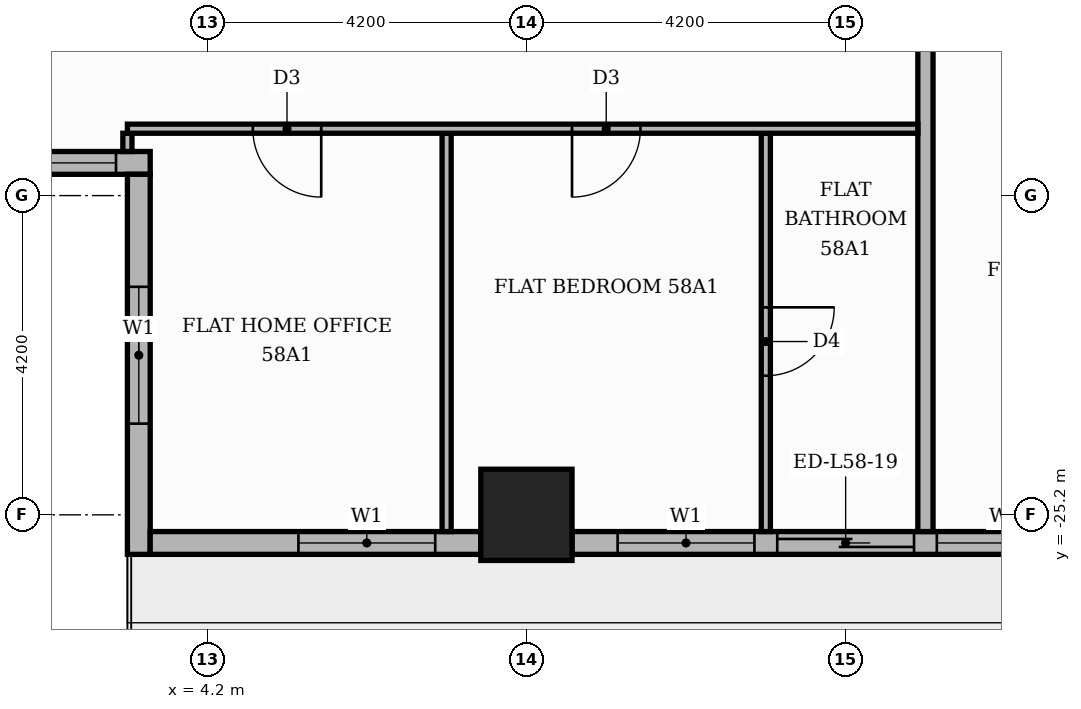
"""IFC4 building model, lengths in metres.
Left out: names, types, materials, properties, quantities, classifications, styles, units other than length and angle.
Written with IfcOpenShell. Run it as: python <this file> out.ifc"""

import sys

from ifc_helpers import new_model, si_unit, direction, frame, frame_2d, origin, origin_2d, place, context, subcontext, project, spatial, rectangle, extrude, element, fill, save


model = new_model("IFC4")
c1 = context("Model", 3, precision=1e-05, world=origin(), true_north=direction((0.0, 1.0)))
c2 = subcontext(c1, "Body", "Model", "MODEL_VIEW")
j1 = project(units=[si_unit("LENGTHUNIT", "METRE"), si_unit("PLANEANGLEUNIT", "RADIAN")], contexts=[c1])
p1 = place(None, origin())
s1 = spatial("IfcSite", under=j1, at=p1, CompositionType="ELEMENT")
p2 = place(p1, origin())
s2 = spatial("IfcBuilding", under=s1, at=p2, CompositionType="ELEMENT")
p3 = place(p2, frame((0.0, 0.0, 244.5)))
s3 = spatial("IfcBuildingStorey", under=s2, at=p3, CompositionType="ELEMENT", Elevation=244.5)
p4 = place(p3, frame((8.4, -25.2, 0.0), z_axis=(0.0, 0.0, 1.0), x_axis=(1.0, 0.0, 0.0)))
e1 = element("IfcColumn", 1, at=p4, inside=s3, PredefinedType="COLUMN", context=c2, shape_type="SweptSolid", body=[
    extrude(rectangle(XDim=1.2, YDim=1.2, at=origin_2d()), origin(), (0.0, 0.0, 1.0), 3.9),
])
p5 = place(p3, frame((-3.15, -20.57, 0.0), z_axis=(0.0, 0.0, 1.0), x_axis=(1.0, 0.0, 0.0)))
e2 = element("IfcWall", 2, at=p5, inside=s3, PredefinedType="STANDARD", context=c2, shape_type="SweptSolid", body=[
    extrude(rectangle(XDim=6.6, YDim=0.3, at=frame_2d((3.3, 0.0))), origin(), (0.0, 0.0, 1.0), 3.48),
])
p6 = place(p5, frame((0.15, 0.0, 0.9)))
e3 = element("IfcOpeningElement", 3, at=p6, cuts=e2, PredefinedType="OPENING", context=c2, shape_type="SweptSolid", body=[
    extrude(rectangle(XDim=6.0, YDim=2.1, at=frame_2d((3.0, 1.05))), frame((0.0, 0.16, 0.0), z_axis=(0.0, -1.0, 0.0), x_axis=(1.0, 0.0, 0.0)), (0.0, 0.0, 1.0), 0.32),
])
p7 = place(p3, frame((3.3, -20.72, 0.0), z_axis=(0.0, 0.0, 1.0), x_axis=(0.0, -1.0, 0.0)))
e4 = element("IfcWall", 4, at=p7, inside=s3, PredefinedType="STANDARD", context=c2, shape_type="SweptSolid", body=[
    extrude(rectangle(XDim=5.0, YDim=0.3, at=frame_2d((2.5, 0.0))), origin(), (0.0, 0.0, 1.0), 3.48),
])
p8 = place(p7, frame((1.48, 0.0, 0.9)))
e5 = element("IfcOpeningElement", 5, at=p8, cuts=e4, PredefinedType="OPENING", context=c2, shape_type="SweptSolid", body=[
    extrude(rectangle(XDim=1.8, YDim=2.1, at=frame_2d((0.9, 1.05))), frame((0.0, 0.16, 0.0), z_axis=(0.0, -1.0, 0.0), x_axis=(1.0, 0.0, 0.0)), (0.0, 0.0, 1.0), 0.32),
])
p9 = place(p3, frame((3.45, -25.57, 0.0), z_axis=(0.0, 0.0, 1.0), x_axis=(1.0, 0.0, 0.0)))
e6 = element("IfcWall", 6, at=p9, inside=s3, PredefinedType="STANDARD", context=c2, shape_type="SweptSolid", body=[
    extrude(rectangle(XDim=4.35, YDim=0.3, at=frame_2d((2.175, 0.0))), origin(), (0.0, 0.0, 1.0), 3.48),
])
p10 = place(p9, frame((1.95, 0.0, 0.9)))
e7 = element("IfcOpeningElement", 7, at=p10, cuts=e6, PredefinedType="OPENING", context=c2, shape_type="SweptSolid", body=[
    extrude(rectangle(XDim=1.8, YDim=2.1, at=frame_2d((0.9, 1.05))), frame((0.0, 0.16, 0.0), z_axis=(0.0, -1.0, 0.0), x_axis=(1.0, 0.0, 0.0)), (0.0, 0.0, 1.0), 0.32),
])
p11 = place(p3, frame((9.0, -25.57, 0.0), z_axis=(0.0, 0.0, 1.0), x_axis=(1.0, 0.0, 0.0)))
e8 = element("IfcWall", 8, at=p11, inside=s3, PredefinedType="STANDARD", context=c2, shape_type="SweptSolid", body=[
    extrude(rectangle(XDim=7.2, YDim=0.3, at=frame_2d((3.6, 0.0))), origin(), (0.0, 0.0, 1.0), 3.48),
])
p12 = place(p11, frame((0.6, 0.0, 0.9)))
e9 = element("IfcOpeningElement", 9, at=p12, cuts=e8, PredefinedType="OPENING", context=c2, shape_type="SweptSolid", body=[
    extrude(rectangle(XDim=1.8, YDim=2.1, at=frame_2d((0.9, 1.05))), frame((0.0, 0.16, 0.0), z_axis=(0.0, -1.0, 0.0), x_axis=(1.0, 0.0, 0.0)), (0.0, 0.0, 1.0), 0.32),
])
p13 = place(p11, frame((2.7, 0.0, 0.0)))
e10 = element("IfcOpeningElement", 10, at=p13, cuts=e8, PredefinedType="OPENING", context=c2, shape_type="SweptSolid", body=[
    extrude(rectangle(XDim=1.8, YDim=2.4, at=frame_2d((0.9, 1.2))), frame((0.0, 0.16, 0.0), z_axis=(0.0, -1.0, 0.0), x_axis=(1.0, 0.0, 0.0)), (0.0, 0.0, 1.0), 0.32),
])
p14 = place(p11, frame((4.8, 0.0, 0.9)))
e11 = element("IfcOpeningElement", 11, at=p14, cuts=e8, PredefinedType="OPENING", context=c2, shape_type="SweptSolid", body=[
    extrude(rectangle(XDim=1.8, YDim=2.1, at=frame_2d((0.9, 1.05))), frame((0.0, 0.16, 0.0), z_axis=(0.0, -1.0, 0.0), x_axis=(1.0, 0.0, 0.0)), (0.0, 0.0, 1.0), 0.32),
])
p15 = place(p3, frame((7.35, -25.42, 0.0), z_axis=(0.0, 0.0, 1.0), x_axis=(0.0, 1.0, 0.0)))
e12 = element("IfcWall", 12, at=p15, inside=s3, PredefinedType="PARTITIONING", context=c2, shape_type="SweptSolid", body=[
    extrude(rectangle(XDim=5.24, YDim=0.12, at=frame_2d((2.62, 0.0))), origin(), (0.0, 0.0, 1.0), 3.48),
])
p16 = place(p3, frame((11.55, -25.42, 0.0), z_axis=(0.0, 0.0, 1.0), x_axis=(0.0, 1.0, 0.0)))
e13 = element("IfcWall", 13, at=p16, inside=s3, PredefinedType="PARTITIONING", context=c2, shape_type="SweptSolid", body=[
    extrude(rectangle(XDim=5.24, YDim=0.12, at=frame_2d((2.62, 0.0))), origin(), (0.0, 0.0, 1.0), 3.48),
])
p17 = place(p16, frame((2.05, 0.0, 0.0)))
e14 = element("IfcOpeningElement", 14, at=p17, cuts=e13, PredefinedType="OPENING", context=c2, shape_type="SweptSolid", body=[
    extrude(rectangle(XDim=0.9, YDim=2.1, at=frame_2d((0.45, 1.05))), frame((0.0, 0.07, 0.0), z_axis=(0.0, -1.0, 0.0), x_axis=(1.0, 0.0, 0.0)), (0.0, 0.0, 1.0), 0.14),
])
p18 = place(p3, frame((13.65, -25.42, 0.0), z_axis=(0.0, 0.0, 1.0), x_axis=(0.0, 1.0, 0.0)))
e15 = element("IfcWall", 15, at=p18, inside=s3, PredefinedType="PARTITIONING", context=c2, shape_type="SweptSolid", body=[
    extrude(rectangle(XDim=11.67, YDim=0.2, at=frame_2d((5.835, 0.0))), origin(), (0.0, 0.0, 1.0), 3.48),
])
p19 = place(p3, frame((3.15, -20.42, 0.0), z_axis=(0.0, 0.0, 1.0), x_axis=(0.0, 1.0, 0.0)))
e16 = element("IfcWall", 16, at=p19, inside=s3, PredefinedType="PARTITIONING", context=c2, shape_type="SweptSolid", body=[
    extrude(rectangle(XDim=0.24, YDim=0.12, at=frame_2d((0.12, 0.0))), origin(), (0.0, 0.0, 1.0), 3.48),
])
p20 = place(p3, frame((3.15, -20.12, 0.0), z_axis=(0.0, 0.0, 1.0), x_axis=(1.0, 0.0, 0.0)))
e17 = element("IfcWall", 17, at=p20, inside=s3, PredefinedType="PARTITIONING", context=c2, shape_type="SweptSolid", body=[
    extrude(rectangle(XDim=10.4, YDim=0.12, at=frame_2d((5.2, 0.0))), origin(), (0.0, 0.0, 1.0), 3.48),
])
p21 = place(p20, frame((1.65, 0.0, 0.0)))
e18 = element("IfcOpeningElement", 18, at=p21, cuts=e17, PredefinedType="OPENING", context=c2, shape_type="SweptSolid", body=[
    extrude(rectangle(XDim=0.9, YDim=2.1, at=frame_2d((0.45, 1.05))), frame((0.0, 0.07, 0.0), z_axis=(0.0, -1.0, 0.0), x_axis=(1.0, 0.0, 0.0)), (0.0, 0.0, 1.0), 0.14),
])
p22 = place(p20, frame((5.85, 0.0, 0.0)))
e19 = element("IfcOpeningElement", 19, at=p22, cuts=e17, PredefinedType="OPENING", context=c2, shape_type="SweptSolid", body=[
    extrude(rectangle(XDim=0.9, YDim=2.1, at=frame_2d((0.45, 1.05))), frame((0.0, 0.07, 0.0), z_axis=(0.0, -1.0, 0.0), x_axis=(1.0, 0.0, 0.0)), (0.0, 0.0, 1.0), 0.14),
])
p23 = place(p6, origin())
e20 = element("IfcWindow", 20, at=p23, inside=s3, PartitioningType="SINGLE_PANEL", PredefinedType="WINDOW", context=c2, shape_type="SweptSolid", body=[
    extrude(rectangle(XDim=6.0, YDim=2.1, at=frame_2d((3.0, 1.05))), frame((0.0, 0.03, 0.0), z_axis=(0.0, -1.0, 0.0), x_axis=(1.0, 0.0, 0.0)), (0.0, 0.0, 1.0), 0.06),
])
fill(e3, e20)
p24 = place(p8, origin())
e21 = element("IfcWindow", 21, at=p24, inside=s3, PartitioningType="SINGLE_PANEL", PredefinedType="WINDOW", context=c2, shape_type="SweptSolid", body=[
    extrude(rectangle(XDim=1.8, YDim=2.1, at=frame_2d((0.9, 1.05))), frame((0.0, 0.03, 0.0), z_axis=(0.0, -1.0, 0.0), x_axis=(1.0, 0.0, 0.0)), (0.0, 0.0, 1.0), 0.06),
])
fill(e5, e21)
p25 = place(p10, origin())
e22 = element("IfcWindow", 22, at=p25, inside=s3, PartitioningType="SINGLE_PANEL", PredefinedType="WINDOW", context=c2, shape_type="SweptSolid", body=[
    extrude(rectangle(XDim=1.8, YDim=2.1, at=frame_2d((0.9, 1.05))), frame((0.0, 0.03, 0.0), z_axis=(0.0, -1.0, 0.0), x_axis=(1.0, 0.0, 0.0)), (0.0, 0.0, 1.0), 0.06),
])
fill(e7, e22)
p26 = place(p12, origin())
e23 = element("IfcWindow", 23, at=p26, inside=s3, PartitioningType="SINGLE_PANEL", PredefinedType="WINDOW", context=c2, shape_type="SweptSolid", body=[
    extrude(rectangle(XDim=1.8, YDim=2.1, at=frame_2d((0.9, 1.05))), frame((0.0, 0.03, 0.0), z_axis=(0.0, -1.0, 0.0), x_axis=(1.0, 0.0, 0.0)), (0.0, 0.0, 1.0), 0.06),
])
fill(e9, e23)
p27 = place(p13, origin())
e24 = element("IfcDoor", 24, at=p27, inside=s3, OperationType="SLIDING_TO_RIGHT", PredefinedType="DOOR", context=c2, shape_type="SweptSolid", body=[
    extrude(rectangle(XDim=1.8, YDim=2.4, at=frame_2d((0.9, 1.2))), frame((0.0, 0.025, 0.0), z_axis=(0.0, -1.0, 0.0), x_axis=(1.0, 0.0, 0.0)), (0.0, 0.0, 1.0), 0.05),
])
fill(e10, e24)
p28 = place(p14, origin())
e25 = element("IfcWindow", 25, at=p28, inside=s3, PartitioningType="SINGLE_PANEL", PredefinedType="WINDOW", context=c2, shape_type="SweptSolid", body=[
    extrude(rectangle(XDim=1.8, YDim=2.1, at=frame_2d((0.9, 1.05))), frame((0.0, 0.03, 0.0), z_axis=(0.0, -1.0, 0.0), x_axis=(1.0, 0.0, 0.0)), (0.0, 0.0, 1.0), 0.06),
])
fill(e11, e25)
p29 = place(p21, frame((0.9, 0.0, 0.0), z_axis=(0.0, 0.0, 1.0), x_axis=(-1.0, 0.0, 0.0)))
e26 = element("IfcDoor", 26, at=p29, inside=s3, OperationType="SINGLE_SWING_RIGHT", PredefinedType="DOOR", context=c2, shape_type="SweptSolid", body=[
    extrude(rectangle(XDim=0.9, YDim=2.1, at=frame_2d((0.45, 1.05))), frame((0.0, 0.025, 0.0), z_axis=(0.0, -1.0, 0.0), x_axis=(1.0, 0.0, 0.0)), (0.0, 0.0, 1.0), 0.05),
])
fill(e18, e26)
p30 = place(p22, frame((0.9, 0.0, 0.0), z_axis=(0.0, 0.0, 1.0), x_axis=(-1.0, 0.0, 0.0)))
e27 = element("IfcDoor", 27, at=p30, inside=s3, OperationType="SINGLE_SWING_LEFT", PredefinedType="DOOR", context=c2, shape_type="SweptSolid", body=[
    extrude(rectangle(XDim=0.9, YDim=2.1, at=frame_2d((0.45, 1.05))), frame((0.0, 0.025, 0.0), z_axis=(0.0, -1.0, 0.0), x_axis=(1.0, 0.0, 0.0)), (0.0, 0.0, 1.0), 0.05),
])
fill(e19, e27)
p31 = place(p17, frame((0.9, 0.0, 0.0), z_axis=(0.0, 0.0, 1.0), x_axis=(-1.0, 0.0, 0.0)))
e28 = element("IfcDoor", 28, at=p31, inside=s3, OperationType="SINGLE_SWING_RIGHT", PredefinedType="DOOR", context=c2, shape_type="SweptSolid", body=[
    extrude(rectangle(XDim=0.9, YDim=2.1, at=frame_2d((0.45, 1.05))), frame((0.0, 0.025, 0.0), z_axis=(0.0, -1.0, 0.0), x_axis=(1.0, 0.0, 0.0)), (0.0, 0.0, 1.0), 0.05),
])
fill(e14, e28)
save(model, sys.argv[1])
